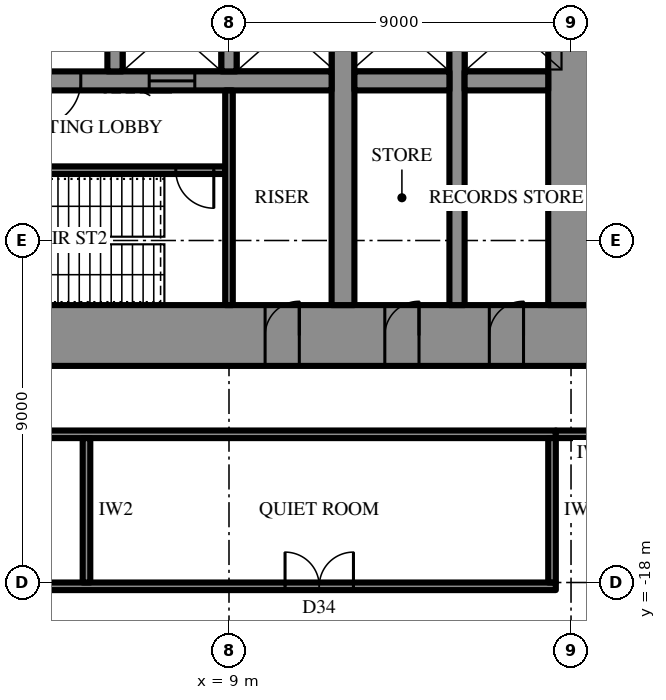
"""IFC4 building model, lengths in metres.
Left out: names, types, materials, properties, quantities, classifications, styles, units other than length and angle.
Written with IfcOpenShell. Run it as: python <this file> out.ifc"""

import sys

from ifc_helpers import new_model, si_unit, direction, frame, frame_2d, origin, place, context, subcontext, project, spatial, rectangle, extrude, element, fill, save


model = new_model("IFC4")
c1 = context("Model", 3, precision=1e-05, world=origin(), true_north=direction((0.0, 1.0)))
c2 = subcontext(c1, "Body", "Model", "MODEL_VIEW")
j1 = project(units=[si_unit("LENGTHUNIT", "METRE"), si_unit("PLANEANGLEUNIT", "RADIAN")], contexts=[c1])
p1 = place(None, origin())
s1 = spatial("IfcSite", under=j1, at=p1, CompositionType="ELEMENT")
p2 = place(p1, origin())
s2 = spatial("IfcBuilding", under=s1, at=p2, CompositionType="ELEMENT")
p3 = place(p2, frame((0.0, 0.0, 36.1)))
s3 = spatial("IfcBuildingStorey", under=s2, at=p3, CompositionType="ELEMENT", Elevation=36.1)
p4 = place(p3, frame((18.6, -11.5, 0.0), z_axis=(0.0, 0.0, 1.0), x_axis=(-1.0, 0.0, 0.0)))
e1 = element("IfcWall", 1, at=p4, inside=s3, PredefinedType="SHEAR", context=c2, shape_type="SweptSolid", body=[
    extrude(rectangle(XDim=37.2, YDim=1.6, at=frame_2d((18.6, 0.0))), origin(), (0.0, 0.0, 1.0), 4.2),
])
p5 = place(p4, frame((19.45, 0.0, 0.0)))
e2 = element("IfcOpeningElement", 2, at=p5, cuts=e1, PredefinedType="OPENING", context=c2, shape_type="SweptSolid", body=[
    extrude(rectangle(XDim=0.9, YDim=2.2, at=frame_2d((0.45, 1.1))), frame((0.0, 0.81, 0.0), z_axis=(0.0, -1.0, 0.0), x_axis=(1.0, 0.0, 0.0)), (0.0, 0.0, 1.0), 1.62),
])
p6 = place(p4, frame((22.45, 0.0, 0.0)))
e3 = element("IfcOpeningElement", 3, at=p6, cuts=e1, PredefinedType="OPENING", context=c2, shape_type="SweptSolid", body=[
    extrude(rectangle(XDim=0.9, YDim=2.2, at=frame_2d((0.45, 1.1))), frame((0.0, 0.81, 0.0), z_axis=(0.0, -1.0, 0.0), x_axis=(1.0, 0.0, 0.0)), (0.0, 0.0, 1.0), 1.62),
])
p7 = place(p4, frame((25.5, 0.0, 0.0)))
e4 = element("IfcOpeningElement", 4, at=p7, cuts=e1, PredefinedType="OPENING", context=c2, shape_type="SweptSolid", body=[
    extrude(rectangle(XDim=1.0, YDim=2.2, at=frame_2d((0.5, 1.1))), frame((0.0, 0.81, 0.0), z_axis=(0.0, -1.0, 0.0), x_axis=(1.0, 0.0, 0.0)), (0.0, 0.0, 1.0), 1.62),
])
p8 = place(p4, frame((1.85, 0.0, 0.0)))
e5 = element("IfcOpeningElement", 5, at=p8, cuts=e1, PredefinedType="OPENING", context=c2, shape_type="SweptSolid", body=[
    extrude(rectangle(XDim=0.9, YDim=2.2, at=frame_2d((0.45, 1.1))), frame((0.0, 0.81, 0.0), z_axis=(0.0, -1.0, 0.0), x_axis=(1.0, 0.0, 0.0)), (0.0, 0.0, 1.0), 1.62),
])
p9 = place(p4, frame((4.6, 0.0, 0.0)))
e6 = element("IfcOpeningElement", 6, at=p9, cuts=e1, PredefinedType="OPENING", context=c2, shape_type="SweptSolid", body=[
    extrude(rectangle(XDim=0.9, YDim=2.2, at=frame_2d((0.45, 1.1))), frame((0.0, 0.81, 0.0), z_axis=(0.0, -1.0, 0.0), x_axis=(1.0, 0.0, 0.0)), (0.0, 0.0, 1.0), 1.62),
])
p10 = place(p4, frame((7.75, 0.0, 0.0)))
e7 = element("IfcOpeningElement", 7, at=p10, cuts=e1, PredefinedType="OPENING", context=c2, shape_type="SweptSolid", body=[
    extrude(rectangle(XDim=0.9, YDim=2.2, at=frame_2d((0.45, 1.1))), frame((0.0, 0.81, 0.0), z_axis=(0.0, -1.0, 0.0), x_axis=(1.0, 0.0, 0.0)), (0.0, 0.0, 1.0), 1.62),
])
p11 = place(p4, frame((28.55, 0.0, 0.0)))
e8 = element("IfcOpeningElement", 8, at=p11, cuts=e1, PredefinedType="OPENING", context=c2, shape_type="SweptSolid", body=[
    extrude(rectangle(XDim=0.9, YDim=2.2, at=frame_2d((0.45, 1.1))), frame((0.0, 0.81, 0.0), z_axis=(0.0, -1.0, 0.0), x_axis=(1.0, 0.0, 0.0)), (0.0, 0.0, 1.0), 1.62),
])
p12 = place(p4, frame((31.7, 0.0, 0.0)))
e9 = element("IfcOpeningElement", 9, at=p12, cuts=e1, PredefinedType="OPENING", context=c2, shape_type="SweptSolid", body=[
    extrude(rectangle(XDim=0.9, YDim=2.2, at=frame_2d((0.45, 1.1))), frame((0.0, 0.81, 0.0), z_axis=(0.0, -1.0, 0.0), x_axis=(1.0, 0.0, 0.0)), (0.0, 0.0, 1.0), 1.62),
])
p13 = place(p4, frame((34.45, 0.0, 0.0)))
e10 = element("IfcOpeningElement", 10, at=p13, cuts=e1, PredefinedType="OPENING", context=c2, shape_type="SweptSolid", body=[
    extrude(rectangle(XDim=0.9, YDim=2.2, at=frame_2d((0.45, 1.1))), frame((0.0, 0.81, 0.0), z_axis=(0.0, -1.0, 0.0), x_axis=(1.0, 0.0, 0.0)), (0.0, 0.0, 1.0), 1.62),
])
p14 = place(p3, frame((18.0, -10.7, 0.0), z_axis=(0.0, 0.0, 1.0), x_axis=(0.0, 1.0, 0.0)))
e11 = element("IfcWall", 11, at=p14, inside=s3, PredefinedType="SHEAR", context=c2, shape_type="SweptSolid", body=[
    extrude(rectangle(XDim=21.4, YDim=1.2, at=frame_2d((10.7, 0.0))), origin(), (0.0, 0.0, 1.0), 4.2),
])
p15 = place(p14, frame((9.8, 0.0, 0.0)))
e12 = element("IfcOpeningElement", 12, at=p15, cuts=e11, PredefinedType="OPENING", context=c2, shape_type="SweptSolid", body=[
    extrude(rectangle(XDim=1.8, YDim=2.4, at=frame_2d((0.9, 1.2))), frame((0.0, 0.61, 0.0), z_axis=(0.0, -1.0, 0.0), x_axis=(1.0, 0.0, 0.0)), (0.0, 0.0, 1.0), 1.22),
])
p16 = place(p3, frame((12.0, -10.7, 0.0), z_axis=(0.0, 0.0, 1.0), x_axis=(0.0, 1.0, 0.0)))
e13 = element("IfcWall", 13, at=p16, inside=s3, PredefinedType="SHEAR", context=c2, shape_type="SweptSolid", body=[
    extrude(rectangle(XDim=21.4, YDim=0.6, at=frame_2d((10.7, 0.0))), origin(), (0.0, 0.0, 1.0), 4.2),
])
p17 = place(p16, frame((9.8, 0.0, 0.0)))
e14 = element("IfcOpeningElement", 14, at=p17, cuts=e13, PredefinedType="OPENING", context=c2, shape_type="SweptSolid", body=[
    extrude(rectangle(XDim=1.8, YDim=2.4, at=frame_2d((0.9, 1.2))), frame((0.0, 0.31, 0.0), z_axis=(0.0, -1.0, 0.0), x_axis=(1.0, 0.0, 0.0)), (0.0, 0.0, 1.0), 0.62),
])
p18 = place(p3, frame((15.0, -10.7, 0.0), z_axis=(0.0, 0.0, 1.0), x_axis=(0.0, 1.0, 0.0)))
e15 = element("IfcWall", 15, at=p18, inside=s3, PredefinedType="SHEAR", context=c2, shape_type="SweptSolid", body=[
    extrude(rectangle(XDim=21.4, YDim=0.4, at=frame_2d((10.7, 0.0))), origin(), (0.0, 0.0, 1.0), 4.2),
])
p19 = place(p18, frame((9.8, 0.0, 0.0)))
e16 = element("IfcOpeningElement", 16, at=p19, cuts=e15, PredefinedType="OPENING", context=c2, shape_type="SweptSolid", body=[
    extrude(rectangle(XDim=1.8, YDim=2.4, at=frame_2d((0.9, 1.2))), frame((0.0, 0.21, 0.0), z_axis=(0.0, -1.0, 0.0), x_axis=(1.0, 0.0, 0.0)), (0.0, 0.0, 1.0), 0.42),
])
p20 = place(p3, frame((17.4, -4.8, 0.0), z_axis=(0.0, 0.0, 1.0), x_axis=(-1.0, 0.0, 0.0)))
e17 = element("IfcWall", 17, at=p20, inside=s3, PredefinedType="SHEAR", context=c2, shape_type="SweptSolid", body=[
    extrude(rectangle(XDim=2.2, YDim=0.5, at=frame_2d((1.1, 0.0))), origin(), (0.0, 0.0, 1.0), 4.2),
])
p21 = place(p3, frame((14.8, -4.8, 0.0), z_axis=(0.0, 0.0, 1.0), x_axis=(-1.0, 0.0, 0.0)))
e18 = element("IfcWall", 18, at=p21, inside=s3, PredefinedType="SHEAR", context=c2, shape_type="SweptSolid", body=[
    extrude(rectangle(XDim=2.5, YDim=0.5, at=frame_2d((1.25, 0.0))), origin(), (0.0, 0.0, 1.0), 4.2),
])
p22 = place(p3, frame((11.7, -4.8, 0.0), z_axis=(0.0, 0.0, 1.0), x_axis=(-1.0, 0.0, 0.0)))
e19 = element("IfcWall", 19, at=p22, inside=s3, PredefinedType="SHEAR", context=c2, shape_type="SweptSolid", body=[
    extrude(rectangle(XDim=23.4, YDim=0.5, at=frame_2d((11.7, 0.0))), origin(), (0.0, 0.0, 1.0), 4.2),
])
p23 = place(p22, frame((6.6, 0.0, 0.0)))
e20 = element("IfcOpeningElement", 20, at=p23, cuts=e19, PredefinedType="OPENING", context=c2, shape_type="SweptSolid", body=[
    extrude(rectangle(XDim=1.2, YDim=2.2, at=frame_2d((0.6, 1.1))), frame((0.0, 0.26, 0.0), z_axis=(0.0, -1.0, 0.0), x_axis=(1.0, 0.0, 0.0)), (0.0, 0.0, 1.0), 0.52),
])
p24 = place(p22, frame((3.6, 0.0, 0.0)))
e21 = element("IfcOpeningElement", 21, at=p24, cuts=e19, PredefinedType="OPENING", context=c2, shape_type="SweptSolid", body=[
    extrude(rectangle(XDim=1.2, YDim=2.2, at=frame_2d((0.6, 1.1))), frame((0.0, 0.26, 0.0), z_axis=(0.0, -1.0, 0.0), x_axis=(1.0, 0.0, 0.0)), (0.0, 0.0, 1.0), 0.52),
])
for number, where, z_axis, x_axis in (
    (22, (9.0, -2.25, 0.0), (0.0, 0.0, 1.0), (0.0, -1.0, 0.0)),
    (23, (6.0, -2.25, 0.0), (0.0, 0.0, 1.0), (0.0, -1.0, 0.0)),
):
    element("IfcWall", number, at=place(p3, frame(where, z_axis=z_axis, x_axis=x_axis)), inside=s3, PredefinedType="SHEAR", context=c2, shape_type="SweptSolid", body=[
        extrude(rectangle(XDim=2.3, YDim=0.4, at=frame_2d((1.15, 0.0))), origin(), (0.0, 0.0, 1.0), 4.2),
    ])
p25 = place(p3, frame((8.9, -7.15, 0.0), z_axis=(0.0, 0.0, 1.0), x_axis=(-1.0, 0.0, 0.0)))
e24 = element("IfcWall", 24, at=p25, inside=s3, PredefinedType="SHEAR", context=c2, shape_type="SweptSolid", body=[
    extrude(rectangle(XDim=8.6, YDim=0.2, at=frame_2d((4.3, 0.0))), origin(), (0.0, 0.0, 1.0), 4.2),
])
p26 = place(p25, frame((0.3, 0.0, 0.0)))
e25 = element("IfcOpeningElement", 25, at=p26, cuts=e24, PredefinedType="OPENING", context=c2, shape_type="SweptSolid", body=[
    extrude(rectangle(XDim=1.0, YDim=2.2, at=frame_2d((0.5, 1.1))), frame((0.0, 0.11, 0.0), z_axis=(0.0, -1.0, 0.0), x_axis=(1.0, 0.0, 0.0)), (0.0, 0.0, 1.0), 0.22),
])
p27 = place(p3, frame((9.0, -5.05, 0.0), z_axis=(0.0, 0.0, 1.0), x_axis=(0.0, -1.0, 0.0)))
e26 = element("IfcWall", 26, at=p27, inside=s3, PredefinedType="PARTITIONING", context=c2, shape_type="SweptSolid", body=[
    extrude(rectangle(XDim=5.65, YDim=0.2, at=frame_2d((2.825, 0.0))), origin(), (0.0, 0.0, 1.0), 4.0),
])
p28 = place(p3, frame((17.6, -14.1, 0.0), z_axis=(0.0, 0.0, 1.0), x_axis=(-1.0, 0.0, 0.0)))
e27 = element("IfcWall", 27, at=p28, inside=s3, PredefinedType="PARTITIONING", context=c2, shape_type="SweptSolid", body=[
    extrude(rectangle(XDim=35.2, YDim=0.2, at=frame_2d((17.6, 0.0))), origin(), (0.0, 0.0, 1.0), 4.0),
])
p29 = place(p3, frame((17.6, -18.1, 0.0), z_axis=(0.0, 0.0, 1.0), x_axis=(-1.0, 0.0, 0.0)))
e28 = element("IfcWall", 28, at=p29, inside=s3, PredefinedType="PARTITIONING", context=c2, shape_type="SweptSolid", body=[
    extrude(rectangle(XDim=35.2, YDim=0.2, at=frame_2d((17.6, 0.0))), origin(), (0.0, 0.0, 1.0), 4.0),
])
p30 = place(p29, frame((5.325, 0.0, 0.0)))
e29 = element("IfcOpeningElement", 29, at=p30, cuts=e28, PredefinedType="OPENING", context=c2, shape_type="SweptSolid", body=[
    extrude(rectangle(XDim=1.8, YDim=2.4, at=frame_2d((0.9, 1.2))), frame((0.0, 0.11, 0.0), z_axis=(0.0, -1.0, 0.0), x_axis=(1.0, 0.0, 0.0)), (0.0, 0.0, 1.0), 0.22),
])
p31 = place(p29, frame((16.225, 0.0, 0.0)))
e30 = element("IfcOpeningElement", 30, at=p31, cuts=e28, PredefinedType="OPENING", context=c2, shape_type="SweptSolid", body=[
    extrude(rectangle(XDim=1.0, YDim=2.2, at=frame_2d((0.5, 1.1))), frame((0.0, 0.11, 0.0), z_axis=(0.0, -1.0, 0.0), x_axis=(1.0, 0.0, 0.0)), (0.0, 0.0, 1.0), 0.22),
])
p32 = place(p29, frame((27.2, 0.0, 0.0)))
e31 = element("IfcOpeningElement", 31, at=p32, cuts=e28, PredefinedType="OPENING", context=c2, shape_type="SweptSolid", body=[
    extrude(rectangle(XDim=1.8, YDim=2.4, at=frame_2d((0.9, 1.2))), frame((0.0, 0.11, 0.0), z_axis=(0.0, -1.0, 0.0), x_axis=(1.0, 0.0, 0.0)), (0.0, 0.0, 1.0), 0.22),
])
p33 = place(p3, frame((17.5, -14.2, 0.0), z_axis=(0.0, 0.0, 1.0), x_axis=(0.0, -1.0, 0.0)))
e32 = element("IfcWall", 32, at=p33, inside=s3, PredefinedType="PARTITIONING", context=c2, shape_type="SweptSolid", body=[
    extrude(rectangle(XDim=3.8, YDim=0.2, at=frame_2d((1.9, 0.0))), origin(), (0.0, 0.0, 1.0), 4.0),
])
p34 = place(p3, frame((5.25, -14.2, 0.0), z_axis=(0.0, 0.0, 1.0), x_axis=(0.0, -1.0, 0.0)))
e33 = element("IfcWall", 33, at=p34, inside=s3, PredefinedType="PARTITIONING", context=c2, shape_type="SweptSolid", body=[
    extrude(rectangle(XDim=3.8, YDim=0.2, at=frame_2d((1.9, 0.0))), origin(), (0.0, 0.0, 1.0), 2.944),
])
p35 = place(p3, frame((19.6, -14.1, 0.0), z_axis=(0.0, 0.0, 1.0), x_axis=(-1.0, 0.0, 0.0)))
e34 = element("IfcWall", 34, at=p35, inside=s3, PredefinedType="PARTITIONING", context=c2, shape_type="SweptSolid", body=[
    extrude(rectangle(XDim=2.0, YDim=0.2, at=frame_2d((1.0, 0.0))), origin(), (0.0, 0.0, 1.0), 4.0),
])
p36 = place(p23, origin())
e35 = element("IfcDoor", 35, at=p36, inside=s3, OperationType="SINGLE_SWING_LEFT", PredefinedType="DOOR", context=c2, shape_type="SweptSolid", body=[
    extrude(rectangle(XDim=1.2, YDim=2.2, at=frame_2d((0.6, 1.1))), frame((0.0, 0.025, 0.0), z_axis=(0.0, -1.0, 0.0), x_axis=(1.0, 0.0, 0.0)), (0.0, 0.0, 1.0), 0.05),
])
fill(e20, e35)
p37 = place(p26, origin())
e36 = element("IfcDoor", 36, at=p37, inside=s3, OperationType="SINGLE_SWING_RIGHT", PredefinedType="DOOR", context=c2, shape_type="SweptSolid", body=[
    extrude(rectangle(XDim=1.0, YDim=2.2, at=frame_2d((0.5, 1.1))), frame((0.0, 0.025, 0.0), z_axis=(0.0, -1.0, 0.0), x_axis=(1.0, 0.0, 0.0)), (0.0, 0.0, 1.0), 0.05),
])
fill(e25, e36)
p38 = place(p8, frame((0.9, 0.0, 0.0), z_axis=(0.0, 0.0, 1.0), x_axis=(-1.0, 0.0, 0.0)))
e37 = element("IfcDoor", 37, at=p38, inside=s3, OperationType="SINGLE_SWING_LEFT", PredefinedType="DOOR", context=c2, shape_type="SweptSolid", body=[
    extrude(rectangle(XDim=0.9, YDim=2.2, at=frame_2d((0.45, 1.1))), frame((0.0, 0.025, 0.0), z_axis=(0.0, -1.0, 0.0), x_axis=(1.0, 0.0, 0.0)), (0.0, 0.0, 1.0), 0.05),
])
fill(e5, e37)
p39 = place(p9, frame((0.9, 0.0, 0.0), z_axis=(0.0, 0.0, 1.0), x_axis=(-1.0, 0.0, 0.0)))
e38 = element("IfcDoor", 38, at=p39, inside=s3, OperationType="SINGLE_SWING_LEFT", PredefinedType="DOOR", context=c2, shape_type="SweptSolid", body=[
    extrude(rectangle(XDim=0.9, YDim=2.2, at=frame_2d((0.45, 1.1))), frame((0.0, 0.025, 0.0), z_axis=(0.0, -1.0, 0.0), x_axis=(1.0, 0.0, 0.0)), (0.0, 0.0, 1.0), 0.05),
])
fill(e6, e38)
p40 = place(p10, frame((0.9, 0.0, 0.0), z_axis=(0.0, 0.0, 1.0), x_axis=(-1.0, 0.0, 0.0)))
e39 = element("IfcDoor", 39, at=p40, inside=s3, OperationType="SINGLE_SWING_LEFT", PredefinedType="DOOR", context=c2, shape_type="SweptSolid", body=[
    extrude(rectangle(XDim=0.9, YDim=2.2, at=frame_2d((0.45, 1.1))), frame((0.0, 0.025, 0.0), z_axis=(0.0, -1.0, 0.0), x_axis=(1.0, 0.0, 0.0)), (0.0, 0.0, 1.0), 0.05),
])
fill(e7, e39)
p41 = place(p24, origin())
e40 = element("IfcDoor", 40, at=p41, inside=s3, OperationType="SLIDING_TO_LEFT", PredefinedType="DOOR", context=c2, shape_type="SweptSolid", body=[
    extrude(rectangle(XDim=1.2, YDim=2.2, at=frame_2d((0.6, 1.1))), frame((0.0, 0.025, 0.0), z_axis=(0.0, -1.0, 0.0), x_axis=(1.0, 0.0, 0.0)), (0.0, 0.0, 1.0), 0.05),
])
fill(e21, e40)
p42 = place(p30, frame((1.8, 0.0, 0.0), z_axis=(0.0, 0.0, 1.0), x_axis=(-1.0, 0.0, 0.0)))
e41 = element("IfcDoor", 41, at=p42, inside=s3, OperationType="DOUBLE_DOOR_SINGLE_SWING", PredefinedType="DOOR", context=c2, shape_type="SweptSolid", body=[
    extrude(rectangle(XDim=1.8, YDim=2.4, at=frame_2d((0.9, 1.2))), frame((0.0, 0.025, 0.0), z_axis=(0.0, -1.0, 0.0), x_axis=(1.0, 0.0, 0.0)), (0.0, 0.0, 1.0), 0.05),
])
fill(e29, e41)
save(model, sys.argv[1])
